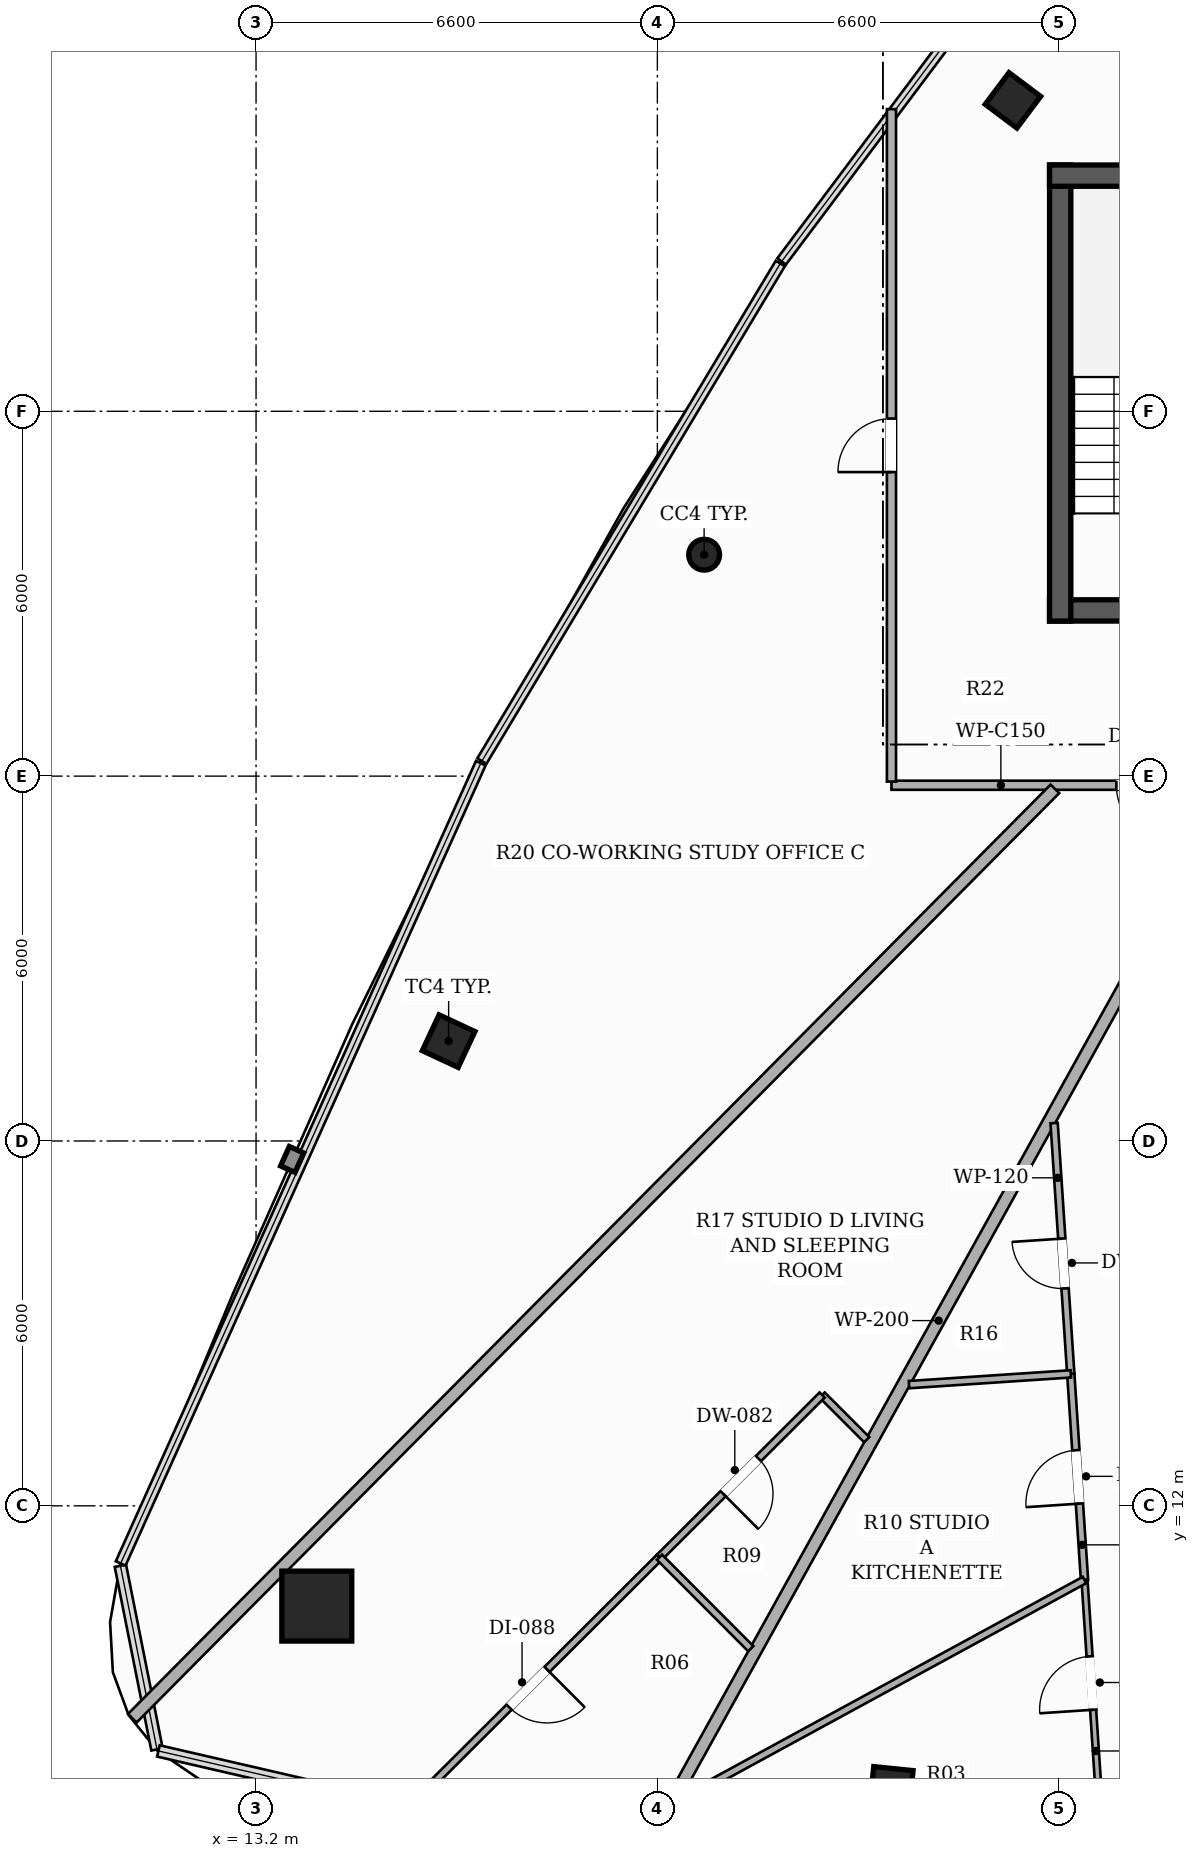
"""IFC4 building model, lengths in metres.
Left out: names, types, materials, properties, quantities, classifications, styles, units other than length and angle.
Written with IfcOpenShell. Run it as: python <this file> out.ifc"""

import sys

from ifc_helpers import new_model, si_unit, direction, frame, frame_2d, origin, origin_2d, place, context, subcontext, project, spatial, rectangle, hollow_rectangle, hollow_circle, extrude, element, fill, save


model = new_model("IFC4")
c1 = context("Model", 3, precision=1e-05, world=origin(), true_north=direction((0.0, 1.0)))
c2 = subcontext(c1, "Body", "Model", "MODEL_VIEW")
j1 = project(units=[si_unit("LENGTHUNIT", "METRE"), si_unit("PLANEANGLEUNIT", "RADIAN")], contexts=[c1])
p1 = place(None, origin())
s1 = spatial("IfcSite", under=j1, at=p1, CompositionType="ELEMENT")
p2 = place(p1, origin())
s2 = spatial("IfcBuilding", under=s1, at=p2, CompositionType="ELEMENT")
p3 = place(p2, frame((0.0, 0.0, 256.85)))
s3 = spatial("IfcBuildingStorey", under=s2, at=p3, CompositionType="ELEMENT", Elevation=256.85)
p4 = place(p3, frame((26.25, 26.725, 0.0), z_axis=(0.0, 0.0, 1.0), x_axis=(1.0, 0.0, 0.0)))
e1 = element("IfcWall", 1, at=p4, inside=s3, PredefinedType="SHEAR", context=c2, shape_type="SweptSolid", body=[
    extrude(rectangle(XDim=13.5, YDim=0.35, at=frame_2d((6.75, 0.0))), origin(), (0.0, 0.0, 1.0), 3.3),
])
p5 = place(p4, frame((4.35, 0.0, 0.0)))
e2 = element("IfcOpeningElement", 2, at=p5, cuts=e1, PredefinedType="OPENING", context=c2, shape_type="SweptSolid", body=[
    extrude(rectangle(XDim=1.05, YDim=2.15, at=frame_2d((0.525, 1.075))), frame((0.0, 0.185, 0.0), z_axis=(0.0, -1.0, 0.0), x_axis=(1.0, 0.0, 0.0)), (0.0, 0.0, 1.0), 0.37),
])
p6 = place(p4, frame((8.3, 0.0, 0.0)))
e3 = element("IfcOpeningElement", 3, at=p6, cuts=e1, PredefinedType="OPENING", context=c2, shape_type="SweptSolid", body=[
    extrude(rectangle(XDim=1.05, YDim=2.15, at=frame_2d((0.525, 1.075))), frame((0.0, 0.185, 0.0), z_axis=(0.0, -1.0, 0.0), x_axis=(1.0, 0.0, 0.0)), (0.0, 0.0, 1.0), 0.37),
])
p7 = place(p3, frame((26.425, 26.55, 0.0), z_axis=(0.0, 0.0, 1.0), x_axis=(0.0, 1.0, 0.0)))
e4 = element("IfcWall", 4, at=p7, inside=s3, PredefinedType="SHEAR", context=c2, shape_type="SweptSolid", body=[
    extrude(rectangle(XDim=7.5, YDim=0.35, at=frame_2d((3.75, 0.0))), origin(), (0.0, 0.0, 1.0), 3.3),
])
p8 = place(p3, frame((26.25, 33.875, 0.0), z_axis=(0.0, 0.0, 1.0), x_axis=(1.0, 0.0, 0.0)))
e5 = element("IfcWall", 5, at=p8, inside=s3, PredefinedType="SHEAR", context=c2, shape_type="SweptSolid", body=[
    extrude(rectangle(XDim=3.6, YDim=0.35, at=frame_2d((1.8, 0.0))), origin(), (0.0, 0.0, 1.0), 3.3),
])
p9 = place(p3, frame((14.199, 10.351, 0.0), z_axis=(0.0, 0.0, 1.0), x_axis=(1.0, 0.0, 0.0)))
e6 = element("IfcColumn", 6, at=p9, inside=s3, PredefinedType="COLUMN", context=c2, shape_type="SweptSolid", body=[
    extrude(hollow_rectangle(XDim=1.15, YDim=1.15, WallThickness=0.036, at=origin_2d()), origin(), (0.0, 0.0, 1.0), 3.3),
])
p10 = place(p3, frame((25.648, 35.113, 0.0), z_axis=(0.0, 0.0, 1.0), x_axis=(0.600420225326, 0.799684658487, 0.0)))
e7 = element("IfcColumn", 7, at=p10, inside=s3, PredefinedType="COLUMN", context=c2, shape_type="SweptSolid", body=[
    extrude(hollow_rectangle(XDim=0.65, YDim=0.65, WallThickness=0.022, at=origin_2d()), origin(), (0.0, 0.0, 1.0), 3.3),
])
p11 = place(p3, frame((20.569, 27.641, 0.0), z_axis=(0.0, 0.0, 1.0), x_axis=(1.0, 0.0, 0.0)))
e8 = element("IfcColumn", 8, at=p11, inside=s3, PredefinedType="COLUMN", context=c2, shape_type="SweptSolid", body=[
    extrude(hollow_circle(Radius=0.254, WallThickness=0.016, at=origin_2d()), origin(), (0.0, 0.0, 1.0), 3.3),
])
for number, where, z_axis, x_axis in (
    (9, (16.367, 19.642, 0.0), (0.0, 0.0, 1.0), (0.423, 0.906, 0.0)),
    (10, (23.649, 7.355, 0.0), (0.0, 0.0, 1.0), (-0.995, 0.101, 0.0)),
):
    element("IfcColumn", number, at=place(p3, frame(where, z_axis=z_axis, x_axis=x_axis)), inside=s3, PredefinedType="COLUMN", context=c2, shape_type="SweptSolid", body=[
        extrude(hollow_rectangle(XDim=0.65, YDim=0.65, WallThickness=0.022, at=origin_2d()), origin(), (0.0, 0.0, 1.0), 3.3),
    ])
p12 = place(p3, frame((32.165, 23.85, 0.0), z_axis=(0.0, 0.0, 1.0), x_axis=(-1.0, 0.0, 0.0)))
e11 = element("IfcWall", 11, at=p12, inside=s3, PredefinedType="PARTITIONING", context=c2, shape_type="SweptSolid", body=[
    extrude(rectangle(XDim=8.515, YDim=0.15, at=frame_2d((4.258, 0.0))), origin(), (0.0, 0.0, 1.0), 2.565),
])
p13 = place(p12, frame((1.133, 0.0, 0.0)))
e12 = element("IfcOpeningElement", 12, at=p13, cuts=e11, PredefinedType="OPENING", context=c2, shape_type="SweptSolid", body=[
    extrude(rectangle(XDim=0.92, YDim=2.15, at=frame_2d((0.46, 1.075))), frame((0.0, 0.085, 0.0), z_axis=(0.0, -1.0, 0.0), x_axis=(1.0, 0.0, 0.0)), (0.0, 0.0, 1.0), 0.17),
])
p14 = place(p12, frame((3.896, 0.0, 0.0)))
e13 = element("IfcOpeningElement", 13, at=p14, cuts=e11, PredefinedType="OPENING", context=c2, shape_type="SweptSolid", body=[
    extrude(rectangle(XDim=0.92, YDim=2.15, at=frame_2d((0.46, 1.075))), frame((0.0, 0.085, 0.0), z_axis=(0.0, -1.0, 0.0), x_axis=(1.0, 0.0, 0.0)), (0.0, 0.0, 1.0), 0.17),
])
p15 = place(p3, frame((23.65, 23.91, 0.0), z_axis=(0.0, 0.0, 1.0), x_axis=(0.0, 1.0, 0.0)))
e14 = element("IfcWall", 14, at=p15, inside=s3, PredefinedType="PARTITIONING", context=c2, shape_type="SweptSolid", body=[
    extrude(rectangle(XDim=11.059, YDim=0.15, at=frame_2d((5.53, 0.0))), origin(), (0.0, 0.0, 1.0), 2.492),
])
p16 = place(p15, frame((5.09, 0.0, 0.0)))
e15 = element("IfcOpeningElement", 15, at=p16, cuts=e14, PredefinedType="OPENING", context=c2, shape_type="SweptSolid", body=[
    extrude(rectangle(XDim=0.88, YDim=2.1, at=frame_2d((0.44, 1.05))), frame((0.0, 0.085, 0.0), z_axis=(0.0, -1.0, 0.0), x_axis=(1.0, 0.0, 0.0)), (0.0, 0.0, 1.0), 0.17),
])
p17 = place(p3, frame((19.575, 6.302, 0.0), z_axis=(0.0, 0.0, 1.0), x_axis=(0.485129783088, 0.874442161358, 0.0)))
e16 = element("IfcWall", 16, at=p17, inside=s3, PredefinedType="PARTITIONING", context=c2, shape_type="SweptSolid", body=[
    extrude(rectangle(XDim=19.999, YDim=0.2, at=frame_2d((10.0, 0.0))), origin(), (0.0, 0.0, 1.0), 2.492),
])
p18 = place(p3, frame((26.338, 23.79, 0.0), z_axis=(0.0, 0.0, 1.0), x_axis=(-0.70454576136, -0.70965855885, 0.0)))
e17 = element("IfcWall", 17, at=p18, inside=s3, PredefinedType="PARTITIONING", context=c2, shape_type="SweptSolid", body=[
    extrude(rectangle(XDim=21.536, YDim=0.2, at=frame_2d((10.768, 0.0))), origin(), (0.0, 0.0, 1.0), 2.492),
])
p19 = place(p3, frame((26.599, 14.17, 0.0), z_axis=(0.0, 0.0, 1.0), x_axis=(-0.066334744758, 0.997797425151, 0.0)))
e18 = element("IfcWall", 18, at=p19, inside=s3, PredefinedType="PARTITIONING", context=c2, shape_type="SweptSolid", body=[
    extrude(rectangle(XDim=4.133, YDim=0.12, at=frame_2d((2.066, 0.0))), origin(), (0.0, 0.0, 1.0), 2.773),
])
p20 = place(p19, frame((1.409, 0.0, 0.0)))
e19 = element("IfcOpeningElement", 19, at=p20, cuts=e18, PredefinedType="OPENING", context=c2, shape_type="SweptSolid", body=[
    extrude(rectangle(XDim=0.82, YDim=2.1, at=frame_2d((0.41, 1.05))), frame((0.0, 0.07, 0.0), z_axis=(0.0, -1.0, 0.0), x_axis=(1.0, 0.0, 0.0)), (0.0, 0.0, 1.0), 0.14),
])
p21 = place(p3, frame((26.825, 10.78, 0.0), z_axis=(0.0, 0.0, 1.0), x_axis=(-0.066471315173, 0.997788336402, 0.0)))
e20 = element("IfcWall", 20, at=p21, inside=s3, PredefinedType="PARTITIONING", context=c2, shape_type="SweptSolid", body=[
    extrude(rectangle(XDim=3.397, YDim=0.12, at=frame_2d((1.699, 0.0))), origin(), (0.0, 0.0, 1.0), 3.06),
])
p22 = place(p21, frame((1.259, 0.0, 0.0)))
e21 = element("IfcOpeningElement", 21, at=p22, cuts=e20, PredefinedType="OPENING", context=c2, shape_type="SweptSolid", body=[
    extrude(rectangle(XDim=0.88, YDim=2.1, at=frame_2d((0.44, 1.05))), frame((0.0, 0.07, 0.0), z_axis=(0.0, -1.0, 0.0), x_axis=(1.0, 0.0, 0.0)), (0.0, 0.0, 1.0), 0.14),
])
p23 = place(p3, frame((37.877, 8.11, 0.0), z_axis=(0.0, 0.0, 1.0), x_axis=(-0.997794804299, -0.066374155471, 0.0)))
e22 = element("IfcWall", 22, at=p23, inside=s3, PredefinedType="PARTITIONING", context=c2, shape_type="SweptSolid", body=[
    extrude(rectangle(XDim=10.851, YDim=0.1, at=frame_2d((5.425, 0.0))), origin(), (0.0, 0.0, 1.0), 2.492),
])
p24 = place(p23, frame((5.581, 0.0, 0.0)))
e23 = element("IfcOpeningElement", 23, at=p24, cuts=e22, PredefinedType="OPENING", context=c2, shape_type="SweptSolid", body=[
    extrude(rectangle(XDim=0.88, YDim=2.1, at=frame_2d((0.44, 1.05))), frame((0.0, 0.06, 0.0), z_axis=(0.0, -1.0, 0.0), x_axis=(1.0, 0.0, 0.0)), (0.0, 0.0, 1.0), 0.12),
])
p25 = place(p3, frame((27.05, 7.39, 0.0), z_axis=(0.0, 0.0, 1.0), x_axis=(-0.066251929929, 0.997802927326, 0.0)))
e24 = element("IfcWall", 24, at=p25, inside=s3, PredefinedType="PARTITIONING", context=c2, shape_type="SweptSolid", body=[
    extrude(rectangle(XDim=3.398, YDim=0.1, at=frame_2d((1.699, 0.0))), origin(), (0.0, 0.0, 1.0), 2.492),
])
p26 = place(p25, frame((1.259, 0.0, 0.0)))
e25 = element("IfcOpeningElement", 25, at=p26, cuts=e24, PredefinedType="OPENING", context=c2, shape_type="SweptSolid", body=[
    extrude(rectangle(XDim=0.88, YDim=2.1, at=frame_2d((0.44, 1.05))), frame((0.0, 0.06, 0.0), z_axis=(0.0, -1.0, 0.0), x_axis=(1.0, 0.0, 0.0)), (0.0, 0.0, 1.0), 0.12),
])
p27 = place(p3, frame((26.599, 14.17, 0.0), z_axis=(0.0, 0.0, 1.0), x_axis=(-0.99779365881, -0.066391373223, 0.0)))
e26 = element("IfcWall", 26, at=p27, inside=s3, PredefinedType="PARTITIONING", context=c2, shape_type="SweptSolid", body=[
    extrude(rectangle(XDim=2.666, YDim=0.12, at=frame_2d((1.333, 0.0))), origin(), (0.0, 0.0, 1.0), 2.773),
])
p28 = place(p3, frame((26.825, 10.78, 0.0), z_axis=(0.0, 0.0, 1.0), x_axis=(-0.87825059366, -0.478200684583, 0.0)))
e27 = element("IfcWall", 27, at=p28, inside=s3, PredefinedType="PARTITIONING", context=c2, shape_type="SweptSolid", body=[
    extrude(rectangle(XDim=7.616, YDim=0.12, at=frame_2d((3.808, 0.0))), origin(), (0.0, 0.0, 1.0), 2.492),
])
p29 = place(p3, frame((23.243, 13.088, 0.0), z_axis=(0.0, 0.0, 1.0), x_axis=(-0.706518163511, 0.707694909286, 0.0)))
e28 = element("IfcWall", 28, at=p29, inside=s3, PredefinedType="PARTITIONING", context=c2, shape_type="SweptSolid", body=[
    extrude(rectangle(XDim=1.037, YDim=0.12, at=frame_2d((0.519, 0.0))), origin(), (0.0, 0.0, 1.0), 3.06),
])
p30 = place(p3, frame((22.51, 13.822, 0.0), z_axis=(0.0, 0.0, 1.0), x_axis=(-0.708172404385, -0.706039549649, 0.0)))
e29 = element("IfcWall", 29, at=p30, inside=s3, PredefinedType="PARTITIONING", context=c2, shape_type="SweptSolid", body=[
    extrude(rectangle(XDim=3.777, YDim=0.12, at=frame_2d((1.889, 0.0))), origin(), (0.0, 0.0, 1.0), 2.773),
])
p31 = place(p30, frame((1.479, 0.0, 0.0)))
e30 = element("IfcOpeningElement", 30, at=p31, cuts=e29, PredefinedType="OPENING", context=c2, shape_type="SweptSolid", body=[
    extrude(rectangle(XDim=0.82, YDim=2.1, at=frame_2d((0.41, 1.05))), frame((0.0, 0.07, 0.0), z_axis=(0.0, -1.0, 0.0), x_axis=(1.0, 0.0, 0.0)), (0.0, 0.0, 1.0), 0.14),
])
p32 = place(p3, frame((19.835, 11.155, 0.0), z_axis=(0.0, 0.0, 1.0), x_axis=(-0.708085833798, -0.706126371108, 0.0)))
e31 = element("IfcWall", 31, at=p32, inside=s3, PredefinedType="PARTITIONING", context=c2, shape_type="SweptSolid", body=[
    extrude(rectangle(XDim=6.105, YDim=0.12, at=frame_2d((3.053, 0.0))), origin(), (0.0, 0.0, 1.0), 2.492),
])
p33 = place(p32, frame((2.613, 0.0, 0.0)))
e32 = element("IfcOpeningElement", 32, at=p33, cuts=e31, PredefinedType="OPENING", context=c2, shape_type="SweptSolid", body=[
    extrude(rectangle(XDim=0.88, YDim=2.1, at=frame_2d((0.44, 1.05))), frame((0.0, 0.07, 0.0), z_axis=(0.0, -1.0, 0.0), x_axis=(1.0, 0.0, 0.0)), (0.0, 0.0, 1.0), 0.14),
])
p34 = place(p3, frame((21.336, 9.651, 0.0), z_axis=(0.0, 0.0, 1.0), x_axis=(-0.70635958505, 0.707853188597, 0.0)))
e33 = element("IfcWall", 33, at=p34, inside=s3, PredefinedType="PARTITIONING", context=c2, shape_type="SweptSolid", body=[
    extrude(rectangle(XDim=2.125, YDim=0.12, at=frame_2d((1.062, 0.0))), origin(), (0.0, 0.0, 1.0), 2.773),
])
p35 = place(p20, origin())
e34 = element("IfcDoor", 34, at=p35, inside=s3, OperationType="SINGLE_SWING_RIGHT", PredefinedType="DOOR", context=c2, shape_type="SweptSolid", body=[
    extrude(rectangle(XDim=0.82, YDim=2.1, at=frame_2d((0.41, 1.05))), frame((0.0, 0.025, 0.0), z_axis=(0.0, -1.0, 0.0), x_axis=(1.0, 0.0, 0.0)), (0.0, 0.0, 1.0), 0.05),
])
fill(e19, e34)
p36 = place(p22, origin())
e35 = element("IfcDoor", 35, at=p36, inside=s3, OperationType="SINGLE_SWING_LEFT", PredefinedType="DOOR", context=c2, shape_type="SweptSolid", body=[
    extrude(rectangle(XDim=0.88, YDim=2.1, at=frame_2d((0.44, 1.05))), frame((0.0, 0.025, 0.0), z_axis=(0.0, -1.0, 0.0), x_axis=(1.0, 0.0, 0.0)), (0.0, 0.0, 1.0), 0.05),
])
fill(e21, e35)
p37 = place(p26, origin())
e36 = element("IfcDoor", 36, at=p37, inside=s3, OperationType="SINGLE_SWING_LEFT", PredefinedType="DOOR", context=c2, shape_type="SweptSolid", body=[
    extrude(rectangle(XDim=0.88, YDim=2.1, at=frame_2d((0.44, 1.05))), frame((0.0, 0.025, 0.0), z_axis=(0.0, -1.0, 0.0), x_axis=(1.0, 0.0, 0.0)), (0.0, 0.0, 1.0), 0.05),
])
fill(e25, e36)
p38 = place(p16, origin())
e37 = element("IfcDoor", 37, at=p38, inside=s3, OperationType="SINGLE_SWING_LEFT", PredefinedType="DOOR", context=c2, shape_type="SweptSolid", body=[
    extrude(rectangle(XDim=0.88, YDim=2.1, at=frame_2d((0.44, 1.05))), frame((0.0, 0.025, 0.0), z_axis=(0.0, -1.0, 0.0), x_axis=(1.0, 0.0, 0.0)), (0.0, 0.0, 1.0), 0.05),
])
fill(e15, e37)
p39 = place(p14, origin())
e38 = element("IfcDoor", 38, at=p39, inside=s3, OperationType="SINGLE_SWING_LEFT", PredefinedType="DOOR", context=c2, shape_type="SweptSolid", body=[
    extrude(rectangle(XDim=0.92, YDim=2.15, at=frame_2d((0.46, 1.075))), frame((0.0, 0.025, 0.0), z_axis=(0.0, -1.0, 0.0), x_axis=(1.0, 0.0, 0.0)), (0.0, 0.0, 1.0), 0.05),
])
fill(e13, e38)
p40 = place(p31, origin())
e39 = element("IfcDoor", 39, at=p40, inside=s3, OperationType="SINGLE_SWING_RIGHT", PredefinedType="DOOR", context=c2, shape_type="SweptSolid", body=[
    extrude(rectangle(XDim=0.82, YDim=2.1, at=frame_2d((0.41, 1.05))), frame((0.0, 0.025, 0.0), z_axis=(0.0, -1.0, 0.0), x_axis=(1.0, 0.0, 0.0)), (0.0, 0.0, 1.0), 0.05),
])
fill(e30, e39)
p41 = place(p33, origin())
e40 = element("IfcDoor", 40, at=p41, inside=s3, OperationType="SINGLE_SWING_LEFT", PredefinedType="DOOR", context=c2, shape_type="SweptSolid", body=[
    extrude(rectangle(XDim=0.88, YDim=2.1, at=frame_2d((0.44, 1.05))), frame((0.0, 0.025, 0.0), z_axis=(0.0, -1.0, 0.0), x_axis=(1.0, 0.0, 0.0)), (0.0, 0.0, 1.0), 0.05),
])
fill(e32, e40)
save(model, sys.argv[1])
